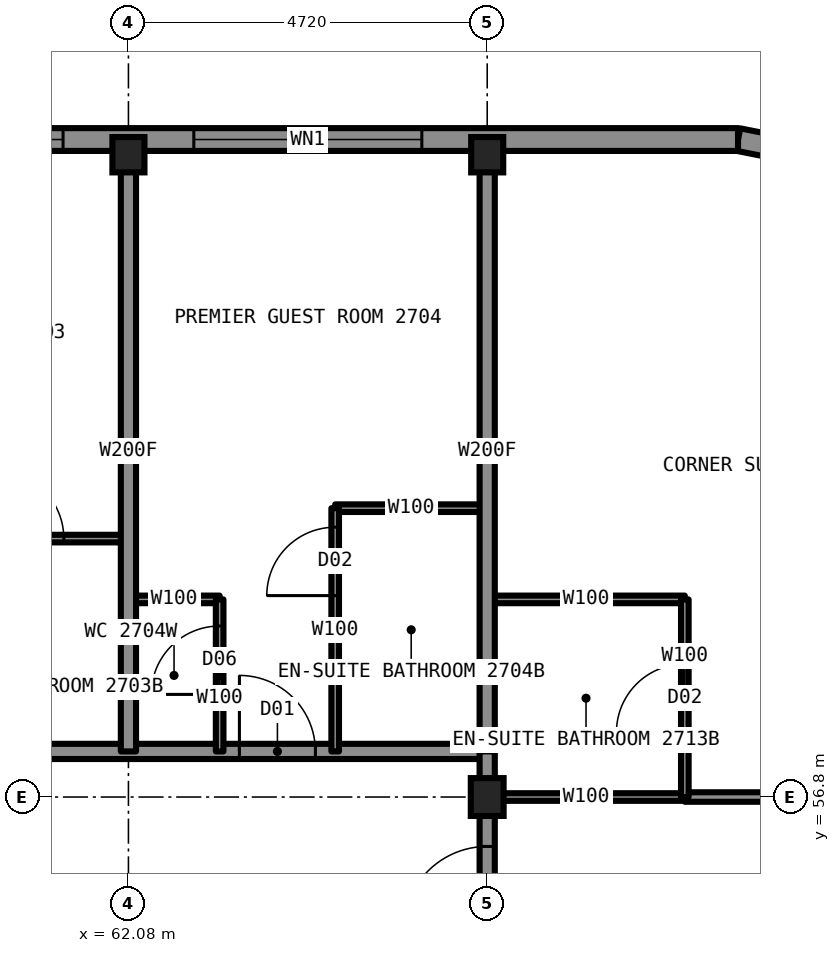
"""IFC4 building model, lengths in metres.
Left out: names, types, materials, properties, quantities, classifications, styles, units other than length and angle.
Written with IfcOpenShell. Run it as: python <this file> out.ifc"""

import sys

from ifc_helpers import new_model, si_unit, direction, frame, frame_2d, origin, origin_2d, place, context, subcontext, project, spatial, rectangle, i_section, extrude, element, fill, save


model = new_model("IFC4")
c1 = context("Model", 3, precision=1e-05, world=origin(), true_north=direction((0.0, 1.0)))
c2 = subcontext(c1, "Body", "Model", "MODEL_VIEW")
j1 = project(units=[si_unit("LENGTHUNIT", "METRE"), si_unit("PLANEANGLEUNIT", "RADIAN")], contexts=[c1])
p1 = place(None, origin())
s1 = spatial("IfcSite", under=j1, at=p1, CompositionType="ELEMENT")
p2 = place(p1, origin())
s2 = spatial("IfcBuilding", under=s1, at=p2, CompositionType="ELEMENT")
p3 = place(p2, frame((0.0, 0.0, 103.9)))
s3 = spatial("IfcBuildingStorey", under=s2, at=p3, CompositionType="ELEMENT", Elevation=103.9)
for number, where, z_axis, x_axis in (
    (1, (62.08, 65.25, 0.0), (0.0, 0.0, 1.0), (1.0, 0.0, 0.0)),
    (2, (66.8, 65.25, 0.0), (0.0, 0.0, 1.0), (1.0, 0.0, 0.0)),
):
    element("IfcColumn", number, at=place(p3, frame(where, z_axis=z_axis, x_axis=x_axis)), inside=s3, PredefinedType="COLUMN", context=c2, shape_type="SweptSolid", body=[
        extrude(i_section(OverallWidth=0.422, OverallDepth=0.465, WebThickness=0.045, FlangeThickness=0.073, at=origin_2d()), origin(), (0.0, 0.0, 1.0), 3.5),
    ])
p4 = place(p3, frame((66.8, 56.8, 0.0), z_axis=(0.0, 0.0, 1.0), x_axis=(1.0, 0.0, 0.0)))
e3 = element("IfcColumn", 3, at=p4, inside=s3, PredefinedType="COLUMN", context=c2, shape_type="SweptSolid", body=[
    extrude(i_section(OverallWidth=0.432, OverallDepth=0.498, WebThickness=0.056, FlangeThickness=0.089, at=origin_2d()), origin(), (0.0, 0.0, 1.0), 3.5),
])
p5 = place(p3, frame((66.8, 56.8, 0.0), z_axis=(0.0, 0.0, 1.0), x_axis=(1.0, 0.0, 0.0)))
e4 = element("IfcWall", 4, at=p5, inside=s3, PredefinedType="PARTITIONING", context=c2, shape_type="SweptSolid", body=[
    extrude(rectangle(XDim=2.6, YDim=0.1, at=frame_2d((1.3, 0.0))), origin(), (0.0, 0.0, 1.0), 2.573),
])
p6 = place(p3, frame((69.4, 56.8, 0.0), z_axis=(0.0, 0.0, 1.0), x_axis=(1.0, 0.0, 0.0)))
e5 = element("IfcWall", 5, at=p6, inside=s3, PredefinedType="PARTITIONING", context=c2, shape_type="SweptSolid", body=[
    extrude(rectangle(XDim=5.9, YDim=0.125, at=frame_2d((2.95, 0.0))), origin(), (0.0, 0.0, 1.0), 2.573),
])
p7 = place(p6, frame((1.15, 0.0, 0.0)))
e6 = element("IfcOpeningElement", 6, at=p7, cuts=e5, PredefinedType="OPENING", context=c2, shape_type="SweptSolid", body=[
    extrude(rectangle(XDim=0.9, YDim=2.2, at=frame_2d((0.45, 1.1))), frame((0.0, 0.073, 0.0), z_axis=(0.0, -1.0, 0.0), x_axis=(1.0, 0.0, 0.0)), (0.0, 0.0, 1.0), 0.145),
])
p8 = place(p3, frame((43.2, 57.4, 0.0), z_axis=(0.0, 0.0, 1.0), x_axis=(1.0, 0.0, 0.0)))
e7 = element("IfcWall", 7, at=p8, inside=s3, PredefinedType="PARTITIONING", context=c2, shape_type="SweptSolid", body=[
    extrude(rectangle(XDim=23.6, YDim=0.2, at=frame_2d((11.8, 0.0))), origin(), (0.0, 0.0, 1.0), 3.33),
])
p9 = place(p8, frame((2.55, 0.0, 0.0)))
e8 = element("IfcOpeningElement", 8, at=p9, cuts=e7, PredefinedType="OPENING", context=c2, shape_type="SweptSolid", body=[
    extrude(rectangle(XDim=1.0, YDim=2.2, at=frame_2d((0.5, 1.1))), frame((0.0, 0.11, 0.0), z_axis=(0.0, -1.0, 0.0), x_axis=(1.0, 0.0, 0.0)), (0.0, 0.0, 1.0), 0.22),
])
p10 = place(p8, frame((7.72, 0.0, 0.0)))
e9 = element("IfcOpeningElement", 9, at=p10, cuts=e7, PredefinedType="OPENING", context=c2, shape_type="SweptSolid", body=[
    extrude(rectangle(XDim=1.0, YDim=2.2, at=frame_2d((0.5, 1.1))), frame((0.0, 0.11, 0.0), z_axis=(0.0, -1.0, 0.0), x_axis=(1.0, 0.0, 0.0)), (0.0, 0.0, 1.0), 0.22),
])
p11 = place(p8, frame((14.56, 0.0, 0.0)))
e10 = element("IfcOpeningElement", 10, at=p11, cuts=e7, PredefinedType="OPENING", context=c2, shape_type="SweptSolid", body=[
    extrude(rectangle(XDim=1.0, YDim=2.2, at=frame_2d((0.5, 1.1))), frame((0.0, 0.11, 0.0), z_axis=(0.0, -1.0, 0.0), x_axis=(1.0, 0.0, 0.0)), (0.0, 0.0, 1.0), 0.22),
])
p12 = place(p8, frame((20.34, 0.0, 0.0)))
e11 = element("IfcOpeningElement", 11, at=p12, cuts=e7, PredefinedType="OPENING", context=c2, shape_type="SweptSolid", body=[
    extrude(rectangle(XDim=1.0, YDim=2.2, at=frame_2d((0.5, 1.1))), frame((0.0, 0.11, 0.0), z_axis=(0.0, -1.0, 0.0), x_axis=(1.0, 0.0, 0.0)), (0.0, 0.0, 1.0), 0.22),
])
p13 = place(p3, frame((62.08, 59.4, 0.0), z_axis=(0.0, 0.0, 1.0), x_axis=(1.0, 0.0, 0.0)))
e12 = element("IfcWall", 12, at=p13, inside=s3, PredefinedType="PARTITIONING", context=c2, shape_type="SweptSolid", body=[
    extrude(rectangle(XDim=1.2, YDim=0.1, at=frame_2d((0.6, 0.0))), origin(), (0.0, 0.0, 1.0), 3.33),
])
p14 = place(p3, frame((66.8, 59.4, 0.0), z_axis=(0.0, 0.0, 1.0), x_axis=(1.0, 0.0, 0.0)))
e13 = element("IfcWall", 13, at=p14, inside=s3, PredefinedType="PARTITIONING", context=c2, shape_type="SweptSolid", body=[
    extrude(rectangle(XDim=2.6, YDim=0.1, at=frame_2d((1.3, 0.0))), origin(), (0.0, 0.0, 1.0), 3.33),
])
p15 = place(p3, frame((59.48, 60.2, 0.0), z_axis=(0.0, 0.0, 1.0), x_axis=(1.0, 0.0, 0.0)))
e14 = element("IfcWall", 14, at=p15, inside=s3, PredefinedType="PARTITIONING", context=c2, shape_type="SweptSolid", body=[
    extrude(rectangle(XDim=2.6, YDim=0.1, at=frame_2d((1.3, 0.0))), origin(), (0.0, 0.0, 1.0), 2.731),
])
p16 = place(p15, frame((0.85, 0.0, 0.0)))
e15 = element("IfcOpeningElement", 15, at=p16, cuts=e14, PredefinedType="OPENING", context=c2, shape_type="SweptSolid", body=[
    extrude(rectangle(XDim=0.9, YDim=2.1, at=frame_2d((0.45, 1.05))), frame((0.0, 0.06, 0.0), z_axis=(0.0, -1.0, 0.0), x_axis=(1.0, 0.0, 0.0)), (0.0, 0.0, 1.0), 0.12),
])
p17 = place(p3, frame((64.8, 60.6, 0.0), z_axis=(0.0, 0.0, 1.0), x_axis=(1.0, 0.0, 0.0)))
e16 = element("IfcWall", 16, at=p17, inside=s3, PredefinedType="PARTITIONING", context=c2, shape_type="SweptSolid", body=[
    extrude(rectangle(XDim=2.0, YDim=0.1, at=frame_2d((1.0, 0.0))), origin(), (0.0, 0.0, 1.0), 3.33),
])
p18 = place(p3, frame((66.8, 33.2, 0.0), z_axis=(0.0, 0.0, 1.0), x_axis=(0.0, 1.0, 0.0)))
e17 = element("IfcWall", 17, at=p18, inside=s3, PredefinedType="PARTITIONING", context=c2, shape_type="SweptSolid", body=[
    extrude(rectangle(XDim=23.58, YDim=0.2, at=frame_2d((11.79, 0.0))), origin(), (0.0, 0.0, 1.0), 3.33),
])
p19 = place(p18, frame((6.98, 0.0, 0.0)))
e18 = element("IfcOpeningElement", 18, at=p19, cuts=e17, PredefinedType="OPENING", context=c2, shape_type="SweptSolid", body=[
    extrude(rectangle(XDim=1.0, YDim=2.2, at=frame_2d((0.5, 1.1))), frame((0.0, 0.11, 0.0), z_axis=(0.0, -1.0, 0.0), x_axis=(1.0, 0.0, 0.0)), (0.0, 0.0, 1.0), 0.22),
])
p20 = place(p18, frame((12.59, 0.0, 0.0)))
e19 = element("IfcOpeningElement", 19, at=p20, cuts=e17, PredefinedType="OPENING", context=c2, shape_type="SweptSolid", body=[
    extrude(rectangle(XDim=1.0, YDim=2.2, at=frame_2d((0.5, 1.1))), frame((0.0, 0.11, 0.0), z_axis=(0.0, -1.0, 0.0), x_axis=(1.0, 0.0, 0.0)), (0.0, 0.0, 1.0), 0.22),
])
p21 = place(p18, frame((16.42, 0.0, 0.0)))
e20 = element("IfcOpeningElement", 20, at=p21, cuts=e17, PredefinedType="OPENING", context=c2, shape_type="SweptSolid", body=[
    extrude(rectangle(XDim=1.0, YDim=2.2, at=frame_2d((0.5, 1.1))), frame((0.0, 0.11, 0.0), z_axis=(0.0, -1.0, 0.0), x_axis=(1.0, 0.0, 0.0)), (0.0, 0.0, 1.0), 0.22),
])
p22 = place(p18, frame((21.85, 0.0, 0.0)))
e21 = element("IfcOpeningElement", 21, at=p22, cuts=e17, PredefinedType="OPENING", context=c2, shape_type="SweptSolid", body=[
    extrude(rectangle(XDim=1.1, YDim=2.2, at=frame_2d((0.55, 1.1))), frame((0.0, 0.11, 0.0), z_axis=(0.0, -1.0, 0.0), x_axis=(1.0, 0.0, 0.0)), (0.0, 0.0, 1.0), 0.22),
])
p23 = place(p18, frame((0.65, 0.0, 0.0)))
e22 = element("IfcOpeningElement", 22, at=p23, cuts=e17, PredefinedType="OPENING", context=c2, shape_type="SweptSolid", body=[
    extrude(rectangle(XDim=1.1, YDim=2.2, at=frame_2d((0.55, 1.1))), frame((0.0, 0.11, 0.0), z_axis=(0.0, -1.0, 0.0), x_axis=(1.0, 0.0, 0.0)), (0.0, 0.0, 1.0), 0.22),
])
p24 = place(p3, frame((66.8, 57.4, 0.0), z_axis=(0.0, 0.0, 1.0), x_axis=(0.0, 1.0, 0.0)))
e23 = element("IfcWall", 23, at=p24, inside=s3, PredefinedType="PARTITIONING", context=c2, shape_type="SweptSolid", body=[
    extrude(rectangle(XDim=7.9, YDim=0.2, at=frame_2d((3.95, 0.0))), origin(), (0.0, 0.0, 1.0), 2.573),
])
p25 = place(p3, frame((69.4, 56.8, 0.0), z_axis=(0.0, 0.0, 1.0), x_axis=(0.0, 1.0, 0.0)))
e24 = element("IfcWall", 24, at=p25, inside=s3, PredefinedType="PARTITIONING", context=c2, shape_type="SweptSolid", body=[
    extrude(rectangle(XDim=2.6, YDim=0.1, at=frame_2d((1.3, 0.0))), origin(), (0.0, 0.0, 1.0), 3.33),
])
p26 = place(p25, frame((0.85, 0.0, 0.0)))
e25 = element("IfcOpeningElement", 25, at=p26, cuts=e24, PredefinedType="OPENING", context=c2, shape_type="SweptSolid", body=[
    extrude(rectangle(XDim=0.9, YDim=2.1, at=frame_2d((0.45, 1.05))), frame((0.0, 0.06, 0.0), z_axis=(0.0, -1.0, 0.0), x_axis=(1.0, 0.0, 0.0)), (0.0, 0.0, 1.0), 0.12),
])
p27 = place(p3, frame((62.08, 57.4, 0.0), z_axis=(0.0, 0.0, 1.0), x_axis=(0.0, 1.0, 0.0)))
e26 = element("IfcWall", 26, at=p27, inside=s3, PredefinedType="PARTITIONING", context=c2, shape_type="SweptSolid", body=[
    extrude(rectangle(XDim=7.9, YDim=0.2, at=frame_2d((3.95, 0.0))), origin(), (0.0, 0.0, 1.0), 2.573),
])
p28 = place(p3, frame((63.28, 57.4, 0.0), z_axis=(0.0, 0.0, 1.0), x_axis=(0.0, 1.0, 0.0)))
e27 = element("IfcWall", 27, at=p28, inside=s3, PredefinedType="PARTITIONING", context=c2, shape_type="SweptSolid", body=[
    extrude(rectangle(XDim=2.0, YDim=0.1, at=frame_2d((1.0, 0.0))), origin(), (0.0, 0.0, 1.0), 3.33),
])
p29 = place(p28, frame((0.75, 0.0, 0.0)))
e28 = element("IfcOpeningElement", 28, at=p29, cuts=e27, PredefinedType="OPENING", context=c2, shape_type="SweptSolid", body=[
    extrude(rectangle(XDim=0.9, YDim=2.1, at=frame_2d((0.45, 1.05))), frame((0.0, 0.06, 0.0), z_axis=(0.0, -1.0, 0.0), x_axis=(1.0, 0.0, 0.0)), (0.0, 0.0, 1.0), 0.12),
])
p30 = place(p3, frame((64.8, 57.4, 0.0), z_axis=(0.0, 0.0, 1.0), x_axis=(0.0, 1.0, 0.0)))
e29 = element("IfcWall", 29, at=p30, inside=s3, PredefinedType="PARTITIONING", context=c2, shape_type="SweptSolid", body=[
    extrude(rectangle(XDim=3.2, YDim=0.1, at=frame_2d((1.6, 0.0))), origin(), (0.0, 0.0, 1.0), 3.33),
])
p31 = place(p30, frame((2.05, 0.0, 0.0)))
e30 = element("IfcOpeningElement", 30, at=p31, cuts=e29, PredefinedType="OPENING", context=c2, shape_type="SweptSolid", body=[
    extrude(rectangle(XDim=0.9, YDim=2.1, at=frame_2d((0.45, 1.05))), frame((0.0, 0.06, 0.0), z_axis=(0.0, -1.0, 0.0), x_axis=(1.0, 0.0, 0.0)), (0.0, 0.0, 1.0), 0.12),
])
p32 = place(p3, frame((72.147, 65.043, 0.0), z_axis=(0.0, 0.0, 1.0), x_axis=(-0.980787050784, 0.195081421501, 0.0)))
e31 = element("IfcWall", 31, at=p32, inside=s3, PredefinedType="SOLIDWALL", context=c2, shape_type="SweptSolid", body=[
    extrude(rectangle(XDim=2.087, YDim=0.3, at=frame_2d((1.044, 0.0))), origin(), (0.0, 0.0, 1.0), 3.33),
])
p33 = place(p32, frame((0.444, 0.0, 0.5)))
e32 = element("IfcOpeningElement", 32, at=p33, cuts=e31, PredefinedType="OPENING", context=c2, shape_type="SweptSolid", body=[
    extrude(rectangle(XDim=1.2, YDim=2.0, at=frame_2d((0.6, 1.0))), frame((0.0, 0.16, 0.0), z_axis=(0.0, -1.0, 0.0), x_axis=(1.0, 0.0, 0.0)), (0.0, 0.0, 1.0), 0.32),
])
p34 = place(p3, frame((70.1, 65.45, 0.0), z_axis=(0.0, 0.0, 1.0), x_axis=(-1.0, 0.0, 0.0)))
e33 = element("IfcWall", 33, at=p34, inside=s3, PredefinedType="SOLIDWALL", context=c2, shape_type="SweptSolid", body=[
    extrude(rectangle(XDim=30.2, YDim=0.3, at=frame_2d((15.1, 0.0))), origin(), (0.0, 0.0, 1.0), 2.83),
])
p35 = place(p34, frame((4.16, 0.0, 0.5)))
e34 = element("IfcOpeningElement", 34, at=p35, cuts=e33, PredefinedType="OPENING", context=c2, shape_type="SweptSolid", body=[
    extrude(rectangle(XDim=3.0, YDim=2.0, at=frame_2d((1.5, 1.0))), frame((0.0, 0.16, 0.0), z_axis=(0.0, -1.0, 0.0), x_axis=(1.0, 0.0, 0.0)), (0.0, 0.0, 1.0), 0.32),
])
p36 = place(p34, frame((8.88, 0.0, 0.5)))
e35 = element("IfcOpeningElement", 35, at=p36, cuts=e33, PredefinedType="OPENING", context=c2, shape_type="SweptSolid", body=[
    extrude(rectangle(XDim=3.0, YDim=2.0, at=frame_2d((1.5, 1.0))), frame((0.0, 0.16, 0.0), z_axis=(0.0, -1.0, 0.0), x_axis=(1.0, 0.0, 0.0)), (0.0, 0.0, 1.0), 0.32),
])
p37 = place(p34, frame((13.6, 0.0, 0.5)))
e36 = element("IfcOpeningElement", 36, at=p37, cuts=e33, PredefinedType="OPENING", context=c2, shape_type="SweptSolid", body=[
    extrude(rectangle(XDim=3.0, YDim=2.0, at=frame_2d((1.5, 1.0))), frame((0.0, 0.16, 0.0), z_axis=(0.0, -1.0, 0.0), x_axis=(1.0, 0.0, 0.0)), (0.0, 0.0, 1.0), 0.32),
])
p38 = place(p34, frame((18.32, 0.0, 0.5)))
e37 = element("IfcOpeningElement", 37, at=p38, cuts=e33, PredefinedType="OPENING", context=c2, shape_type="SweptSolid", body=[
    extrude(rectangle(XDim=3.0, YDim=2.0, at=frame_2d((1.5, 1.0))), frame((0.0, 0.16, 0.0), z_axis=(0.0, -1.0, 0.0), x_axis=(1.0, 0.0, 0.0)), (0.0, 0.0, 1.0), 0.32),
])
p39 = place(p34, frame((23.04, 0.0, 0.5)))
e38 = element("IfcOpeningElement", 38, at=p39, cuts=e33, PredefinedType="OPENING", context=c2, shape_type="SweptSolid", body=[
    extrude(rectangle(XDim=3.0, YDim=2.0, at=frame_2d((1.5, 1.0))), frame((0.0, 0.16, 0.0), z_axis=(0.0, -1.0, 0.0), x_axis=(1.0, 0.0, 0.0)), (0.0, 0.0, 1.0), 0.32),
])
p40 = place(p3, frame((66.8, 56.78, 0.0), z_axis=(0.0, 0.0, 1.0), x_axis=(0.0, 1.0, 0.0)))
e39 = element("IfcWall", 39, at=p40, inside=s3, PredefinedType="PARTITIONING", context=c2, shape_type="SweptSolid", body=[
    extrude(rectangle(XDim=0.62, YDim=0.2, at=frame_2d((0.31, 0.0))), origin(), (0.0, 0.0, 1.0), 2.573),
])
p41 = place(p16, origin())
e40 = element("IfcDoor", 40, at=p41, inside=s3, OperationType="SINGLE_SWING_RIGHT", PredefinedType="DOOR", context=c2, shape_type="SweptSolid", body=[
    extrude(rectangle(XDim=0.9, YDim=2.1, at=frame_2d((0.45, 1.05))), frame((0.0, 0.025, 0.0), z_axis=(0.0, -1.0, 0.0), x_axis=(1.0, 0.0, 0.0)), (0.0, 0.0, 1.0), 0.05),
])
fill(e15, e40)
p42 = place(p12, origin())
e41 = element("IfcDoor", 41, at=p42, inside=s3, OperationType="SINGLE_SWING_LEFT", PredefinedType="DOOR", context=c2, shape_type="SweptSolid", body=[
    extrude(rectangle(XDim=1.0, YDim=2.2, at=frame_2d((0.5, 1.1))), frame((0.0, 0.025, 0.0), z_axis=(0.0, -1.0, 0.0), x_axis=(1.0, 0.0, 0.0)), (0.0, 0.0, 1.0), 0.05),
])
fill(e11, e41)
p43 = place(p31, origin())
e42 = element("IfcDoor", 42, at=p43, inside=s3, OperationType="SINGLE_SWING_RIGHT", PredefinedType="DOOR", context=c2, shape_type="SweptSolid", body=[
    extrude(rectangle(XDim=0.9, YDim=2.1, at=frame_2d((0.45, 1.05))), frame((0.0, 0.025, 0.0), z_axis=(0.0, -1.0, 0.0), x_axis=(1.0, 0.0, 0.0)), (0.0, 0.0, 1.0), 0.05),
])
fill(e30, e42)
p44 = place(p29, origin())
e43 = element("IfcDoor", 43, at=p44, inside=s3, OperationType="SINGLE_SWING_LEFT", PredefinedType="DOOR", context=c2, shape_type="SweptSolid", body=[
    extrude(rectangle(XDim=0.9, YDim=2.1, at=frame_2d((0.45, 1.05))), frame((0.0, 0.025, 0.0), z_axis=(0.0, -1.0, 0.0), x_axis=(1.0, 0.0, 0.0)), (0.0, 0.0, 1.0), 0.05),
])
fill(e28, e43)
p45 = place(p22, origin())
e44 = element("IfcDoor", 44, at=p45, inside=s3, OperationType="SINGLE_SWING_LEFT", PredefinedType="DOOR", context=c2, shape_type="SweptSolid", body=[
    extrude(rectangle(XDim=1.1, YDim=2.2, at=frame_2d((0.55, 1.1))), frame((0.0, 0.025, 0.0), z_axis=(0.0, -1.0, 0.0), x_axis=(1.0, 0.0, 0.0)), (0.0, 0.0, 1.0), 0.05),
])
fill(e21, e44)
p46 = place(p26, origin())
e45 = element("IfcDoor", 45, at=p46, inside=s3, OperationType="SINGLE_SWING_RIGHT", PredefinedType="DOOR", context=c2, shape_type="SweptSolid", body=[
    extrude(rectangle(XDim=0.9, YDim=2.1, at=frame_2d((0.45, 1.05))), frame((0.0, 0.025, 0.0), z_axis=(0.0, -1.0, 0.0), x_axis=(1.0, 0.0, 0.0)), (0.0, 0.0, 1.0), 0.05),
])
fill(e25, e45)
p47 = place(p35, origin())
e46 = element("IfcWindow", 46, at=p47, inside=s3, PartitioningType="SINGLE_PANEL", PredefinedType="WINDOW", context=c2, shape_type="SweptSolid", body=[
    extrude(rectangle(XDim=3.0, YDim=2.0, at=frame_2d((1.5, 1.0))), frame((0.0, 0.03, 0.0), z_axis=(0.0, -1.0, 0.0), x_axis=(1.0, 0.0, 0.0)), (0.0, 0.0, 1.0), 0.06),
])
fill(e34, e46)
p48 = place(p36, origin())
e47 = element("IfcWindow", 47, at=p48, inside=s3, PartitioningType="SINGLE_PANEL", PredefinedType="WINDOW", context=c2, shape_type="SweptSolid", body=[
    extrude(rectangle(XDim=3.0, YDim=2.0, at=frame_2d((1.5, 1.0))), frame((0.0, 0.03, 0.0), z_axis=(0.0, -1.0, 0.0), x_axis=(1.0, 0.0, 0.0)), (0.0, 0.0, 1.0), 0.06),
])
fill(e35, e47)
save(model, sys.argv[1])
